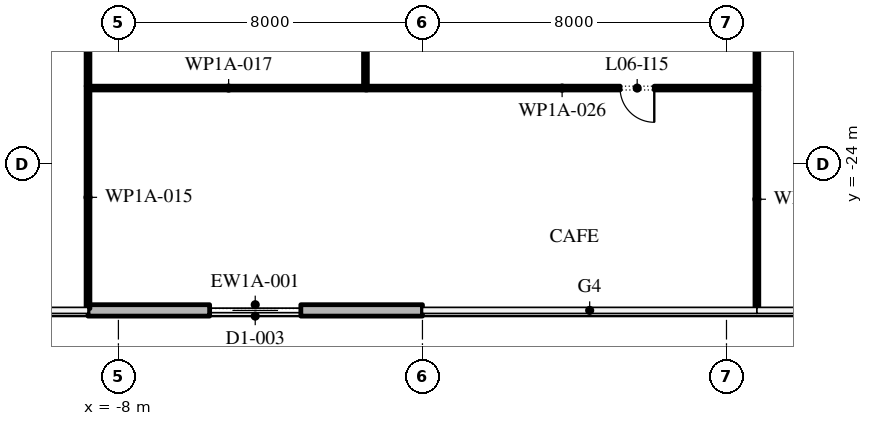
"""IFC4 building model, lengths in metres.
Left out: names, types, materials, properties, quantities, classifications, styles, units other than length and angle.
Written with IfcOpenShell. Run it as: python <this file> out.ifc"""

import sys

from ifc_helpers import new_model, si_unit, direction, frame, frame_2d, origin, place, context, subcontext, project, spatial, rectangle, extrude, element, fill, save


model = new_model("IFC4")
c1 = context("Model", 3, precision=1e-05, world=origin(), true_north=direction((0.0, 1.0)))
c2 = subcontext(c1, "Body", "Model", "MODEL_VIEW")
j1 = project(units=[si_unit("LENGTHUNIT", "METRE"), si_unit("PLANEANGLEUNIT", "RADIAN")], contexts=[c1])
p1 = place(None, origin())
s1 = spatial("IfcSite", under=j1, at=p1, CompositionType="ELEMENT")
p2 = place(p1, origin())
s2 = spatial("IfcBuilding", under=s1, at=p2, CompositionType="ELEMENT")
p3 = place(p2, frame((0.0, 0.0, 33.6)))
s3 = spatial("IfcBuildingStorey", under=s2, at=p3, CompositionType="ELEMENT", Elevation=33.6)
p4 = place(p3, frame((-8.8, -27.85, 0.0), z_axis=(0.0, 0.0, 1.0), x_axis=(1.0, 0.0, 0.0)))
e1 = element("IfcWall", 1, at=p4, inside=s3, PredefinedType="STANDARD", context=c2, shape_type="SweptSolid", body=[
    extrude(rectangle(XDim=8.8, YDim=0.3, at=frame_2d((4.4, 0.0))), origin(), (0.0, 0.0, 1.0), 5.8),
])
p5 = place(p4, frame((3.2, 0.0, 0.0)))
e2 = element("IfcOpeningElement", 2, at=p5, cuts=e1, PredefinedType="OPENING", context=c2, shape_type="SweptSolid", body=[
    extrude(rectangle(XDim=2.4, YDim=3.5, at=frame_2d((1.2, 1.75))), frame((0.0, 0.16, 0.0), z_axis=(0.0, -1.0, 0.0), x_axis=(1.0, 0.0, 0.0)), (0.0, 0.0, 1.0), 0.32),
])
p6 = place(p3, frame((-8.8, -27.8, 0.0), z_axis=(0.0, 0.0, 1.0), x_axis=(0.0, 1.0, 0.0)))
e3 = element("IfcWall", 3, at=p6, inside=s3, PredefinedType="PARTITIONING", context=c2, shape_type="SweptSolid", body=[
    extrude(rectangle(XDim=5.85, YDim=0.1, at=frame_2d((2.925, 0.0))), origin(), (0.0, 0.0, 1.0), 5.8),
])
p7 = place(p3, frame((-8.8, -21.95, 0.0), z_axis=(0.0, 0.0, 1.0), x_axis=(0.0, 1.0, 0.0)))
e4 = element("IfcWall", 4, at=p7, inside=s3, PredefinedType="PARTITIONING", context=c2, shape_type="SweptSolid", body=[
    extrude(rectangle(XDim=4.025, YDim=0.1, at=frame_2d((2.012, 0.0))), origin(), (0.0, 0.0, 1.0), 5.8),
])
p8 = place(p3, frame((-8.75, -22.0, 0.0), z_axis=(0.0, 0.0, 1.0), x_axis=(1.0, 0.0, 0.0)))
e5 = element("IfcWall", 5, at=p8, inside=s3, PredefinedType="PARTITIONING", context=c2, shape_type="SweptSolid", body=[
    extrude(rectangle(XDim=7.3, YDim=0.1, at=frame_2d((3.65, 0.0))), origin(), (0.0, 0.0, 1.0), 5.8),
])
p9 = place(p3, frame((-1.5, -21.95, 0.0), z_axis=(0.0, 0.0, 1.0), x_axis=(0.0, 1.0, 0.0)))
e6 = element("IfcWall", 6, at=p9, inside=s3, PredefinedType="PARTITIONING", context=c2, shape_type="SweptSolid", body=[
    extrude(rectangle(XDim=11.83, YDim=0.1, at=frame_2d((5.915, 0.0))), origin(), (0.0, 0.0, 1.0), 5.8),
])
p10 = place(p3, frame((-1.5, -22.0, 0.0), z_axis=(0.0, 0.0, 1.0), x_axis=(1.0, 0.0, 0.0)))
e7 = element("IfcWall", 7, at=p10, inside=s3, PredefinedType="PARTITIONING", context=c2, shape_type="SweptSolid", body=[
    extrude(rectangle(XDim=10.35, YDim=0.1, at=frame_2d((5.175, 0.0))), origin(), (0.0, 0.0, 1.0), 5.8),
])
p11 = place(p10, frame((6.7, 0.0, 0.0)))
e8 = element("IfcOpeningElement", 8, at=p11, cuts=e7, PredefinedType="OPENING", context=c2, shape_type="SweptSolid", body=[
    extrude(rectangle(XDim=0.9, YDim=2.1, at=frame_2d((0.45, 1.05))), frame((0.0, 0.06, 0.0), z_axis=(0.0, -1.0, 0.0), x_axis=(1.0, 0.0, 0.0)), (0.0, 0.0, 1.0), 0.12),
])
p12 = place(p3, frame((8.8, -27.8, 0.0), z_axis=(0.0, 0.0, 1.0), x_axis=(0.0, 1.0, 0.0)))
e9 = element("IfcWall", 9, at=p12, inside=s3, PredefinedType="PARTITIONING", context=c2, shape_type="SweptSolid", body=[
    extrude(rectangle(XDim=5.75, YDim=0.1, at=frame_2d((2.875, 0.0))), origin(), (0.0, 0.0, 1.0), 5.8),
])
p13 = place(p3, frame((8.8, -21.95, 0.0), z_axis=(0.0, 0.0, 1.0), x_axis=(0.0, 1.0, 0.0)))
e10 = element("IfcWall", 10, at=p13, inside=s3, PredefinedType="PARTITIONING", context=c2, shape_type="SweptSolid", body=[
    extrude(rectangle(XDim=4.025, YDim=0.1, at=frame_2d((2.012, 0.0))), origin(), (0.0, 0.0, 1.0), 5.8),
])
p14 = place(p5, origin())
e11 = element("IfcDoor", 11, at=p14, inside=s3, OperationType="DOUBLE_DOOR_SLIDING", PredefinedType="DOOR", context=c2, shape_type="SweptSolid", body=[
    extrude(rectangle(XDim=2.4, YDim=3.5, at=frame_2d((1.2, 1.75))), frame((0.0, 0.025, 0.0), z_axis=(0.0, -1.0, 0.0), x_axis=(1.0, 0.0, 0.0)), (0.0, 0.0, 1.0), 0.05),
])
fill(e2, e11)
p15 = place(p11, frame((0.9, 0.0, 0.0), z_axis=(0.0, 0.0, 1.0), x_axis=(-1.0, 0.0, 0.0)))
e12 = element("IfcDoor", 12, at=p15, inside=s3, OperationType="SINGLE_SWING_RIGHT", PredefinedType="DOOR", context=c2, shape_type="SweptSolid", body=[
    extrude(rectangle(XDim=0.9, YDim=2.1, at=frame_2d((0.45, 1.05))), frame((0.0, 0.025, 0.0), z_axis=(0.0, -1.0, 0.0), x_axis=(1.0, 0.0, 0.0)), (0.0, 0.0, 1.0), 0.05),
])
fill(e8, e12)
save(model, sys.argv[1])
